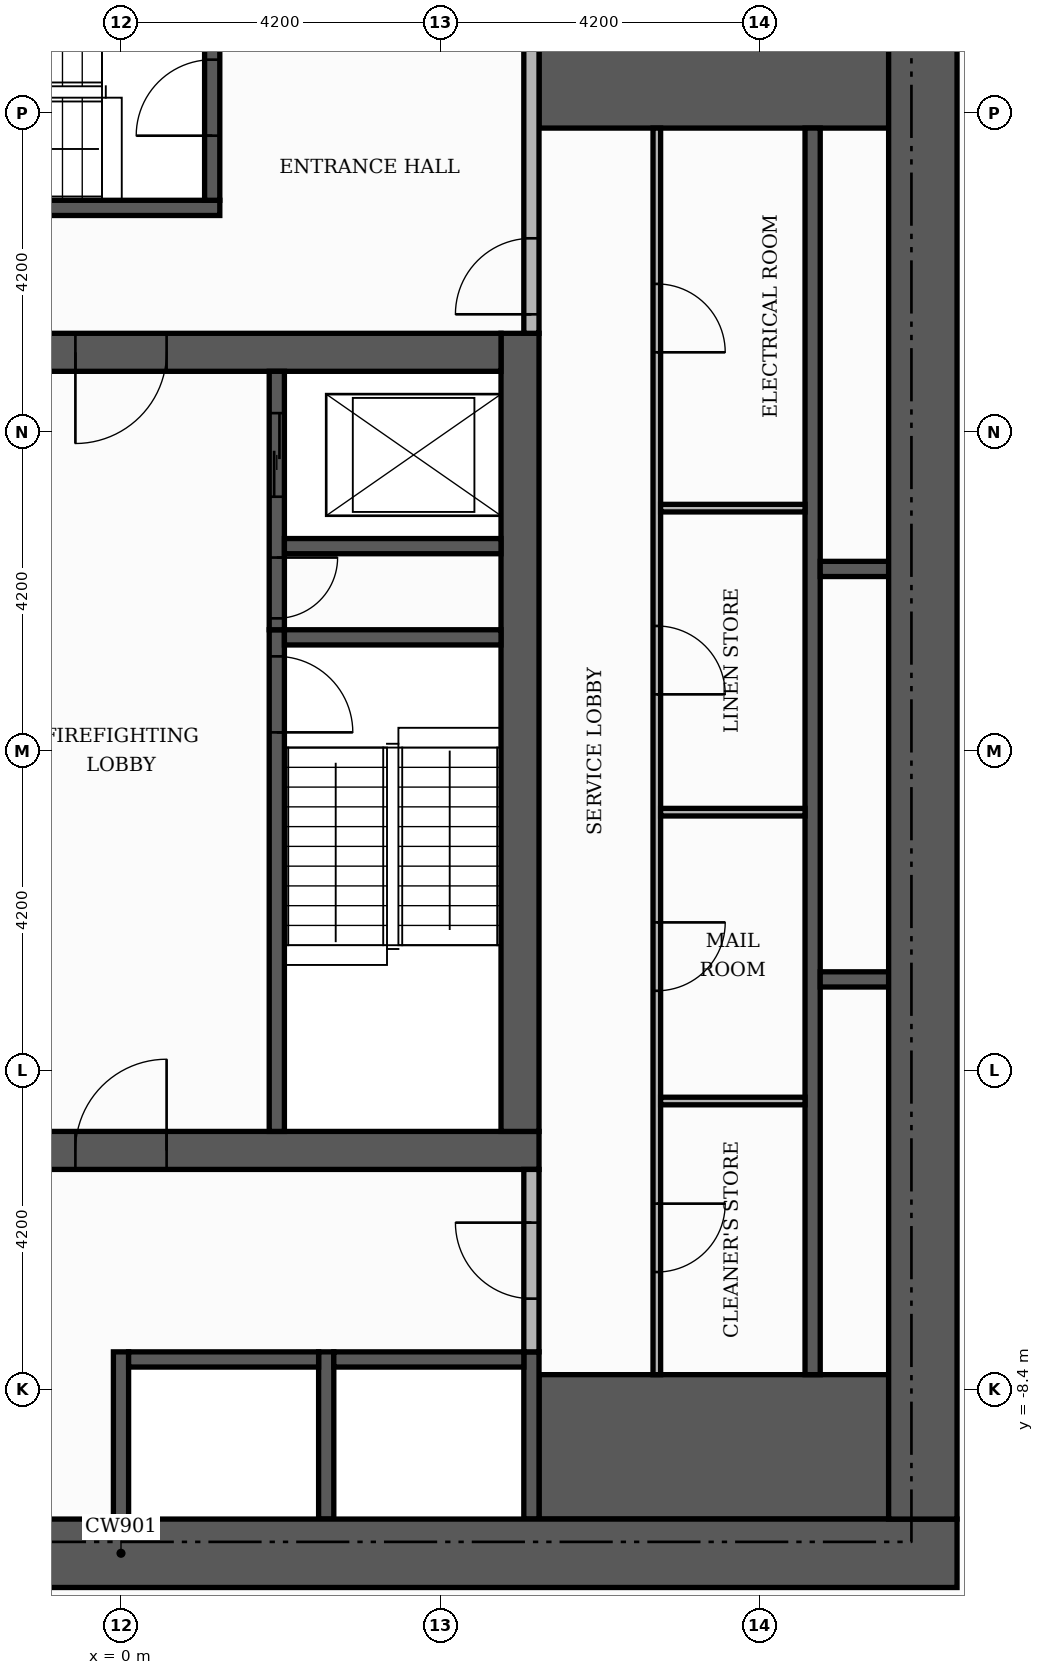
"""IFC4 building model, lengths in metres.
Left out: names, types, materials, properties, quantities, classifications, styles, units other than length and angle.
Written with IfcOpenShell. Run it as: python <this file> out.ifc"""

import sys

from ifc_helpers import new_model, si_unit, direction, frame, frame_2d, origin, place, context, subcontext, project, spatial, rectangle, extrude, element, fill, save


model = new_model("IFC4")
c1 = context("Model", 3, precision=1e-05, world=origin(), true_north=direction((0.0, 1.0)))
c2 = subcontext(c1, "Body", "Model", "MODEL_VIEW")
j1 = project(units=[si_unit("LENGTHUNIT", "METRE"), si_unit("PLANEANGLEUNIT", "RADIAN")], contexts=[c1])
p1 = place(None, origin())
s1 = spatial("IfcSite", under=j1, at=p1, CompositionType="ELEMENT")
p2 = place(p1, origin())
s2 = spatial("IfcBuilding", under=s1, at=p2, CompositionType="ELEMENT")
p3 = place(p2, frame((0.0, 0.0, 27.0)))
s3 = spatial("IfcBuildingStorey", under=s2, at=p3, CompositionType="ELEMENT", Elevation=27.0)
p4 = place(p3, frame((-5.5, -5.25, 0.0), z_axis=(0.0, 0.0, 1.0), x_axis=(1.0, 0.0, 0.0)))
e1 = element("IfcWall", 1, at=p4, inside=s3, PredefinedType="SHEAR", context=c2, shape_type="SweptSolid", body=[
    extrude(rectangle(XDim=11.0, YDim=0.5, at=frame_2d((5.5, 0.0))), origin(), (0.0, 0.0, 1.0), 3.48),
])
p5 = place(p4, frame((4.9, 0.0, 0.0)))
e2 = element("IfcOpeningElement", 2, at=p5, cuts=e1, PredefinedType="OPENING", context=c2, shape_type="SweptSolid", body=[
    extrude(rectangle(XDim=1.2, YDim=2.1, at=frame_2d((0.6, 1.05))), frame((0.0, 0.26, 0.0), z_axis=(0.0, -1.0, 0.0), x_axis=(1.0, 0.0, 0.0)), (0.0, 0.0, 1.0), 0.52),
])
p6 = place(p3, frame((5.25, -5.0, 0.0), z_axis=(0.0, 0.0, 1.0), x_axis=(0.0, 1.0, 0.0)))
e3 = element("IfcWall", 3, at=p6, inside=s3, PredefinedType="SHEAR", context=c2, shape_type="SweptSolid", body=[
    extrude(rectangle(XDim=10.5, YDim=0.5, at=frame_2d((5.25, 0.0))), origin(), (0.0, 0.0, 1.0), 3.48),
])
p7 = place(p3, frame((-5.0, 5.25, 0.0), z_axis=(0.0, 0.0, 1.0), x_axis=(1.0, 0.0, 0.0)))
e4 = element("IfcWall", 4, at=p7, inside=s3, PredefinedType="SHEAR", context=c2, shape_type="SweptSolid", body=[
    extrude(rectangle(XDim=10.0, YDim=0.5, at=frame_2d((5.0, 0.0))), origin(), (0.0, 0.0, 1.0), 3.48),
])
p8 = place(p7, frame((4.4, 0.0, 0.0)))
e5 = element("IfcOpeningElement", 5, at=p8, cuts=e4, PredefinedType="OPENING", context=c2, shape_type="SweptSolid", body=[
    extrude(rectangle(XDim=1.2, YDim=2.1, at=frame_2d((0.6, 1.05))), frame((0.0, 0.26, 0.0), z_axis=(0.0, -1.0, 0.0), x_axis=(1.0, 0.0, 0.0)), (0.0, 0.0, 1.0), 0.52),
])
for number, where, z_axis, x_axis in (
    (6, (5.5, -9.15, 0.0), (0.0, 0.0, 1.0), (1.0, 0.0, 0.0)),
    (7, (5.5, 9.15, 0.0), (0.0, 0.0, 1.0), (1.0, 0.0, 0.0)),
):
    element("IfcWall", number, at=place(p3, frame(where, z_axis=z_axis, x_axis=x_axis)), inside=s3, PredefinedType="SHEAR", context=c2, shape_type="SweptSolid", body=[
        extrude(rectangle(XDim=4.6, YDim=1.9, at=frame_2d((2.3, 0.0))), origin(), (0.0, 0.0, 1.0), 3.48),
    ])
p9 = place(p3, frame((2.05, -5.0, 0.0), z_axis=(0.0, 0.0, 1.0), x_axis=(0.0, 1.0, 0.0)))
e8 = element("IfcWall", 8, at=p9, inside=s3, PredefinedType="SHEAR", context=c2, shape_type="SweptSolid", body=[
    extrude(rectangle(XDim=6.6, YDim=0.2, at=frame_2d((3.3, 0.0))), origin(), (0.0, 0.0, 1.0), 3.48),
])
p10 = place(p9, frame((5.25, 0.0, 0.0)))
e9 = element("IfcOpeningElement", 9, at=p10, cuts=e8, PredefinedType="OPENING", context=c2, shape_type="SweptSolid", body=[
    extrude(rectangle(XDim=1.0, YDim=2.1, at=frame_2d((0.5, 1.05))), frame((0.0, 0.11, 0.0), z_axis=(0.0, -1.0, 0.0), x_axis=(1.0, 0.0, 0.0)), (0.0, 0.0, 1.0), 0.22),
])
p11 = place(p3, frame((2.15, 1.5, 0.0), z_axis=(0.0, 0.0, 1.0), x_axis=(1.0, 0.0, 0.0)))
e10 = element("IfcWall", 10, at=p11, inside=s3, PredefinedType="SHEAR", context=c2, shape_type="SweptSolid", body=[
    extrude(rectangle(XDim=2.85, YDim=0.2, at=frame_2d((1.425, 0.0))), origin(), (0.0, 0.0, 1.0), 3.48),
])
p12 = place(p3, frame((-5.5, 7.15, 0.0), z_axis=(0.0, 0.0, 1.0), x_axis=(1.0, 0.0, 0.0)))
e11 = element("IfcWall", 11, at=p12, inside=s3, PredefinedType="SHEAR", context=c2, shape_type="SweptSolid", body=[
    extrude(rectangle(XDim=6.8, YDim=0.2, at=frame_2d((3.4, 0.0))), origin(), (0.0, 0.0, 1.0), 3.48),
])
p13 = place(p3, frame((1.2, 7.25, 0.0), z_axis=(0.0, 0.0, 1.0), x_axis=(0.0, 1.0, 0.0)))
e12 = element("IfcWall", 12, at=p13, inside=s3, PredefinedType="SHEAR", context=c2, shape_type="SweptSolid", body=[
    extrude(rectangle(XDim=2.85, YDim=0.2, at=frame_2d((1.425, 0.0))), origin(), (0.0, 0.0, 1.0), 3.48),
])
p14 = place(p13, frame((0.85, 0.0, 0.0)))
e13 = element("IfcOpeningElement", 13, at=p14, cuts=e12, PredefinedType="OPENING", context=c2, shape_type="SweptSolid", body=[
    extrude(rectangle(XDim=1.0, YDim=2.1, at=frame_2d((0.5, 1.05))), frame((0.0, 0.11, 0.0), z_axis=(0.0, -1.0, 0.0), x_axis=(1.0, 0.0, 0.0)), (0.0, 0.0, 1.0), 0.22),
])
for number, where, z_axis, x_axis in (
    (14, (0.0, -10.1, 0.0), (0.0, 0.0, 1.0), (0.0, 1.0, 0.0)),
    (15, (2.7, -10.1, 0.0), (0.0, 0.0, 1.0), (0.0, 1.0, 0.0)),
    (16, (5.4, -10.1, 0.0), (0.0, 0.0, 1.0), (0.0, 1.0, 0.0)),
):
    element("IfcWall", number, at=place(p3, frame(where, z_axis=z_axis, x_axis=x_axis)), inside=s3, PredefinedType="SHEAR", context=c2, shape_type="SweptSolid", body=[
        extrude(rectangle(XDim=2.2, YDim=0.2, at=frame_2d((1.1, 0.0))), origin(), (0.0, 0.0, 1.0), 3.48),
    ])
p15 = place(p3, frame((9.1, -8.2, 0.0), z_axis=(0.0, 0.0, 1.0), x_axis=(0.0, 1.0, 0.0)))
e17 = element("IfcWall", 17, at=p15, inside=s3, PredefinedType="SHEAR", context=c2, shape_type="SweptSolid", body=[
    extrude(rectangle(XDim=16.4, YDim=0.2, at=frame_2d((8.2, 0.0))), origin(), (0.0, 0.0, 1.0), 3.48),
])
for number, where, z_axis, x_axis in (
    (18, (0.1, -8.0, 0.0), (0.0, 0.0, 1.0), (1.0, 0.0, 0.0)),
    (19, (2.8, -8.0, 0.0), (0.0, 0.0, 1.0), (1.0, 0.0, 0.0)),
):
    element("IfcWall", number, at=place(p3, frame(where, z_axis=z_axis, x_axis=x_axis)), inside=s3, PredefinedType="SHEAR", context=c2, shape_type="SweptSolid", body=[
        extrude(rectangle(XDim=2.5, YDim=0.2, at=frame_2d((1.25, 0.0))), origin(), (0.0, 0.0, 1.0), 3.48),
    ])
p16 = place(p3, frame((9.2, -3.0, 0.0), z_axis=(0.0, 0.0, 1.0), x_axis=(1.0, 0.0, 0.0)))
e20 = element("IfcWall", 20, at=p16, inside=s3, PredefinedType="SHEAR", context=c2, shape_type="SweptSolid", body=[
    extrude(rectangle(XDim=0.9, YDim=0.2, at=frame_2d((0.45, 0.0))), origin(), (0.0, 0.0, 1.0), 3.48),
])
p17 = place(p3, frame((2.05, 1.6, 0.0), z_axis=(0.0, 0.0, 1.0), x_axis=(0.0, 1.0, 0.0)))
e21 = element("IfcWall", 21, at=p17, inside=s3, PredefinedType="SHEAR", context=c2, shape_type="SweptSolid", body=[
    extrude(rectangle(XDim=3.4, YDim=0.2, at=frame_2d((1.7, 0.0))), origin(), (0.0, 0.0, 1.0), 3.48),
])
p18 = place(p17, frame((1.75, 0.0, 0.0)))
e22 = element("IfcOpeningElement", 22, at=p18, cuts=e21, PredefinedType="OPENING", context=c2, shape_type="SweptSolid", body=[
    extrude(rectangle(XDim=1.1, YDim=2.1, at=frame_2d((0.55, 1.05))), frame((0.0, 0.11, 0.0), z_axis=(0.0, -1.0, 0.0), x_axis=(1.0, 0.0, 0.0)), (0.0, 0.0, 1.0), 0.22),
])
p19 = place(p17, frame((0.15, 0.0, 0.0)))
e23 = element("IfcOpeningElement", 23, at=p19, cuts=e21, PredefinedType="OPENING", context=c2, shape_type="SweptSolid", body=[
    extrude(rectangle(XDim=0.8, YDim=2.1, at=frame_2d((0.4, 1.05))), frame((0.0, 0.11, 0.0), z_axis=(0.0, -1.0, 0.0), x_axis=(1.0, 0.0, 0.0)), (0.0, 0.0, 1.0), 0.22),
])
p20 = place(p3, frame((9.2, 2.4, 0.0), z_axis=(0.0, 0.0, 1.0), x_axis=(1.0, 0.0, 0.0)))
e24 = element("IfcWall", 24, at=p20, inside=s3, PredefinedType="SHEAR", context=c2, shape_type="SweptSolid", body=[
    extrude(rectangle(XDim=0.9, YDim=0.2, at=frame_2d((0.45, 0.0))), origin(), (0.0, 0.0, 1.0), 3.48),
])
p21 = place(p3, frame((2.15, 2.7, 0.0), z_axis=(0.0, 0.0, 1.0), x_axis=(1.0, 0.0, 0.0)))
e25 = element("IfcWall", 25, at=p21, inside=s3, PredefinedType="SHEAR", context=c2, shape_type="SweptSolid", body=[
    extrude(rectangle(XDim=2.85, YDim=0.2, at=frame_2d((1.425, 0.0))), origin(), (0.0, 0.0, 1.0), 3.48),
])
p22 = place(p3, frame((-11.0, -10.55, 0.0), z_axis=(0.0, 0.0, 1.0), x_axis=(1.0, 0.0, 0.0)))
e26 = element("IfcWall", 26, at=p22, inside=s3, PredefinedType="SHEAR", context=c2, shape_type="SweptSolid", body=[
    extrude(rectangle(XDim=22.0, YDim=0.9, at=frame_2d((11.0, 0.0))), origin(), (0.0, 0.0, 1.0), 3.48),
])
p23 = place(p22, frame((7.4, 0.0, 0.0)))
e27 = element("IfcOpeningElement", 27, at=p23, cuts=e26, PredefinedType="OPENING", context=c2, shape_type="SweptSolid", body=[
    extrude(rectangle(XDim=1.8, YDim=2.2, at=frame_2d((0.9, 1.1))), frame((0.0, 0.46, 0.0), z_axis=(0.0, -1.0, 0.0), x_axis=(1.0, 0.0, 0.0)), (0.0, 0.0, 1.0), 0.92),
])
p24 = place(p3, frame((10.55, -10.1, 0.0), z_axis=(0.0, 0.0, 1.0), x_axis=(0.0, 1.0, 0.0)))
e28 = element("IfcWall", 28, at=p24, inside=s3, PredefinedType="SHEAR", context=c2, shape_type="SweptSolid", body=[
    extrude(rectangle(XDim=20.2, YDim=0.9, at=frame_2d((10.1, 0.0))), origin(), (0.0, 0.0, 1.0), 3.48),
])
p25 = place(p3, frame((7.05, -8.2, 0.0), z_axis=(0.0, 0.0, 1.0), x_axis=(0.0, 1.0, 0.0)))
e29 = element("IfcWall", 29, at=p25, inside=s3, PredefinedType="PARTITIONING", context=c2, shape_type="SweptSolid", body=[
    extrude(rectangle(XDim=16.4, YDim=0.1, at=frame_2d((8.2, 0.0))), origin(), (0.0, 0.0, 1.0), 3.48),
])
p26 = place(p25, frame((1.35, 0.0, 0.0)))
e30 = element("IfcOpeningElement", 30, at=p26, cuts=e29, PredefinedType="OPENING", context=c2, shape_type="SweptSolid", body=[
    extrude(rectangle(XDim=0.9, YDim=2.1, at=frame_2d((0.45, 1.05))), frame((0.0, 0.06, 0.0), z_axis=(0.0, -1.0, 0.0), x_axis=(1.0, 0.0, 0.0)), (0.0, 0.0, 1.0), 0.12),
])
p27 = place(p25, frame((5.05, 0.0, 0.0)))
e31 = element("IfcOpeningElement", 31, at=p27, cuts=e29, PredefinedType="OPENING", context=c2, shape_type="SweptSolid", body=[
    extrude(rectangle(XDim=0.9, YDim=2.1, at=frame_2d((0.45, 1.05))), frame((0.0, 0.06, 0.0), z_axis=(0.0, -1.0, 0.0), x_axis=(1.0, 0.0, 0.0)), (0.0, 0.0, 1.0), 0.12),
])
p28 = place(p25, frame((8.95, 0.0, 0.0)))
e32 = element("IfcOpeningElement", 32, at=p28, cuts=e29, PredefinedType="OPENING", context=c2, shape_type="SweptSolid", body=[
    extrude(rectangle(XDim=0.9, YDim=2.1, at=frame_2d((0.45, 1.05))), frame((0.0, 0.06, 0.0), z_axis=(0.0, -1.0, 0.0), x_axis=(1.0, 0.0, 0.0)), (0.0, 0.0, 1.0), 0.12),
])
p29 = place(p25, frame((13.45, 0.0, 0.0)))
e33 = element("IfcOpeningElement", 33, at=p29, cuts=e29, PredefinedType="OPENING", context=c2, shape_type="SweptSolid", body=[
    extrude(rectangle(XDim=0.9, YDim=2.1, at=frame_2d((0.45, 1.05))), frame((0.0, 0.06, 0.0), z_axis=(0.0, -1.0, 0.0), x_axis=(1.0, 0.0, 0.0)), (0.0, 0.0, 1.0), 0.12),
])
p30 = place(p3, frame((5.4, -7.9, 0.0), z_axis=(0.0, 0.0, 1.0), x_axis=(0.0, 1.0, 0.0)))
e34 = element("IfcWall", 34, at=p30, inside=s3, PredefinedType="PARTITIONING", context=c2, shape_type="SweptSolid", body=[
    extrude(rectangle(XDim=2.4, YDim=0.2, at=frame_2d((1.2, 0.0))), origin(), (0.0, 0.0, 1.0), 3.48),
])
p31 = place(p30, frame((0.7, 0.0, 0.0)))
e35 = element("IfcOpeningElement", 35, at=p31, cuts=e34, PredefinedType="OPENING", context=c2, shape_type="SweptSolid", body=[
    extrude(rectangle(XDim=1.0, YDim=2.1, at=frame_2d((0.5, 1.05))), frame((0.0, 0.11, 0.0), z_axis=(0.0, -1.0, 0.0), x_axis=(1.0, 0.0, 0.0)), (0.0, 0.0, 1.0), 0.22),
])
for number, where, z_axis, x_axis in (
    (36, (7.1, -4.6, 0.0), (0.0, 0.0, 1.0), (1.0, 0.0, 0.0)),
    (37, (7.1, -0.8, 0.0), (0.0, 0.0, 1.0), (1.0, 0.0, 0.0)),
    (38, (7.1, 3.2, 0.0), (0.0, 0.0, 1.0), (1.0, 0.0, 0.0)),
):
    element("IfcWall", number, at=place(p3, frame(where, z_axis=z_axis, x_axis=x_axis)), inside=s3, PredefinedType="PARTITIONING", context=c2, shape_type="SweptSolid", body=[
        extrude(rectangle(XDim=1.9, YDim=0.1, at=frame_2d((0.95, 0.0))), origin(), (0.0, 0.0, 1.0), 3.48),
    ])
p32 = place(p3, frame((5.4, 5.5, 0.0), z_axis=(0.0, 0.0, 1.0), x_axis=(0.0, 1.0, 0.0)))
e39 = element("IfcWall", 39, at=p32, inside=s3, PredefinedType="PARTITIONING", context=c2, shape_type="SweptSolid", body=[
    extrude(rectangle(XDim=4.6, YDim=0.2, at=frame_2d((2.3, 0.0))), origin(), (0.0, 0.0, 1.0), 3.48),
])
p33 = place(p32, frame((0.25, 0.0, 0.0)))
e40 = element("IfcOpeningElement", 40, at=p33, cuts=e39, PredefinedType="OPENING", context=c2, shape_type="SweptSolid", body=[
    extrude(rectangle(XDim=1.0, YDim=2.1, at=frame_2d((0.5, 1.05))), frame((0.0, 0.11, 0.0), z_axis=(0.0, -1.0, 0.0), x_axis=(1.0, 0.0, 0.0)), (0.0, 0.0, 1.0), 0.22),
])
p34 = place(p18, origin())
e41 = element("IfcDoor", 41, at=p34, inside=s3, OperationType="SLIDING_TO_LEFT", PredefinedType="DOOR", context=c2, shape_type="SweptSolid", body=[
    extrude(rectangle(XDim=1.1, YDim=2.1, at=frame_2d((0.55, 1.05))), frame((0.0, 0.025, 0.0), z_axis=(0.0, -1.0, 0.0), x_axis=(1.0, 0.0, 0.0)), (0.0, 0.0, 1.0), 0.05),
])
fill(e22, e41)
p35 = place(p10, frame((1.0, 0.0, 0.0), z_axis=(0.0, 0.0, 1.0), x_axis=(-1.0, 0.0, 0.0)))
e42 = element("IfcDoor", 42, at=p35, inside=s3, OperationType="SINGLE_SWING_LEFT", PredefinedType="DOOR", context=c2, shape_type="SweptSolid", body=[
    extrude(rectangle(XDim=1.0, YDim=2.1, at=frame_2d((0.5, 1.05))), frame((0.0, 0.025, 0.0), z_axis=(0.0, -1.0, 0.0), x_axis=(1.0, 0.0, 0.0)), (0.0, 0.0, 1.0), 0.05),
])
fill(e9, e42)
p36 = place(p19, frame((0.8, 0.0, 0.0), z_axis=(0.0, 0.0, 1.0), x_axis=(-1.0, 0.0, 0.0)))
e43 = element("IfcDoor", 43, at=p36, inside=s3, OperationType="SINGLE_SWING_RIGHT", PredefinedType="DOOR", context=c2, shape_type="SweptSolid", body=[
    extrude(rectangle(XDim=0.8, YDim=2.1, at=frame_2d((0.4, 1.05))), frame((0.0, 0.025, 0.0), z_axis=(0.0, -1.0, 0.0), x_axis=(1.0, 0.0, 0.0)), (0.0, 0.0, 1.0), 0.05),
])
fill(e23, e43)
p37 = place(p8, frame((1.2, 0.0, 0.0), z_axis=(0.0, 0.0, 1.0), x_axis=(-1.0, 0.0, 0.0)))
e44 = element("IfcDoor", 44, at=p37, inside=s3, OperationType="SINGLE_SWING_LEFT", PredefinedType="DOOR", context=c2, shape_type="SweptSolid", body=[
    extrude(rectangle(XDim=1.2, YDim=2.1, at=frame_2d((0.6, 1.05))), frame((0.0, 0.025, 0.0), z_axis=(0.0, -1.0, 0.0), x_axis=(1.0, 0.0, 0.0)), (0.0, 0.0, 1.0), 0.05),
])
fill(e5, e44)
p38 = place(p5, origin())
e45 = element("IfcDoor", 45, at=p38, inside=s3, OperationType="SINGLE_SWING_RIGHT", PredefinedType="DOOR", context=c2, shape_type="SweptSolid", body=[
    extrude(rectangle(XDim=1.2, YDim=2.1, at=frame_2d((0.6, 1.05))), frame((0.0, 0.025, 0.0), z_axis=(0.0, -1.0, 0.0), x_axis=(1.0, 0.0, 0.0)), (0.0, 0.0, 1.0), 0.05),
])
fill(e2, e45)
p39 = place(p14, origin())
e46 = element("IfcDoor", 46, at=p39, inside=s3, OperationType="SINGLE_SWING_LEFT", PredefinedType="DOOR", context=c2, shape_type="SweptSolid", body=[
    extrude(rectangle(XDim=1.0, YDim=2.1, at=frame_2d((0.5, 1.05))), frame((0.0, 0.025, 0.0), z_axis=(0.0, -1.0, 0.0), x_axis=(1.0, 0.0, 0.0)), (0.0, 0.0, 1.0), 0.05),
])
fill(e13, e46)
p40 = place(p33, origin())
e47 = element("IfcDoor", 47, at=p40, inside=s3, OperationType="SINGLE_SWING_LEFT", PredefinedType="DOOR", context=c2, shape_type="SweptSolid", body=[
    extrude(rectangle(XDim=1.0, YDim=2.1, at=frame_2d((0.5, 1.05))), frame((0.0, 0.025, 0.0), z_axis=(0.0, -1.0, 0.0), x_axis=(1.0, 0.0, 0.0)), (0.0, 0.0, 1.0), 0.05),
])
fill(e40, e47)
p41 = place(p31, origin())
e48 = element("IfcDoor", 48, at=p41, inside=s3, OperationType="SINGLE_SWING_RIGHT", PredefinedType="DOOR", context=c2, shape_type="SweptSolid", body=[
    extrude(rectangle(XDim=1.0, YDim=2.1, at=frame_2d((0.5, 1.05))), frame((0.0, 0.025, 0.0), z_axis=(0.0, -1.0, 0.0), x_axis=(1.0, 0.0, 0.0)), (0.0, 0.0, 1.0), 0.05),
])
fill(e35, e48)
p42 = place(p26, frame((0.9, 0.0, 0.0), z_axis=(0.0, 0.0, 1.0), x_axis=(-1.0, 0.0, 0.0)))
e49 = element("IfcDoor", 49, at=p42, inside=s3, OperationType="SINGLE_SWING_RIGHT", PredefinedType="DOOR", context=c2, shape_type="SweptSolid", body=[
    extrude(rectangle(XDim=0.9, YDim=2.1, at=frame_2d((0.45, 1.05))), frame((0.0, 0.025, 0.0), z_axis=(0.0, -1.0, 0.0), x_axis=(1.0, 0.0, 0.0)), (0.0, 0.0, 1.0), 0.05),
])
fill(e30, e49)
p43 = place(p27, frame((0.9, 0.0, 0.0), z_axis=(0.0, 0.0, 1.0), x_axis=(-1.0, 0.0, 0.0)))
e50 = element("IfcDoor", 50, at=p43, inside=s3, OperationType="SINGLE_SWING_RIGHT", PredefinedType="DOOR", context=c2, shape_type="SweptSolid", body=[
    extrude(rectangle(XDim=0.9, YDim=2.1, at=frame_2d((0.45, 1.05))), frame((0.0, 0.025, 0.0), z_axis=(0.0, -1.0, 0.0), x_axis=(1.0, 0.0, 0.0)), (0.0, 0.0, 1.0), 0.05),
])
fill(e31, e50)
p44 = place(p28, frame((0.9, 0.0, 0.0), z_axis=(0.0, 0.0, 1.0), x_axis=(-1.0, 0.0, 0.0)))
e51 = element("IfcDoor", 51, at=p44, inside=s3, OperationType="SINGLE_SWING_LEFT", PredefinedType="DOOR", context=c2, shape_type="SweptSolid", body=[
    extrude(rectangle(XDim=0.9, YDim=2.1, at=frame_2d((0.45, 1.05))), frame((0.0, 0.025, 0.0), z_axis=(0.0, -1.0, 0.0), x_axis=(1.0, 0.0, 0.0)), (0.0, 0.0, 1.0), 0.05),
])
fill(e32, e51)
p45 = place(p29, frame((0.9, 0.0, 0.0), z_axis=(0.0, 0.0, 1.0), x_axis=(-1.0, 0.0, 0.0)))
e52 = element("IfcDoor", 52, at=p45, inside=s3, OperationType="SINGLE_SWING_LEFT", PredefinedType="DOOR", context=c2, shape_type="SweptSolid", body=[
    extrude(rectangle(XDim=0.9, YDim=2.1, at=frame_2d((0.45, 1.05))), frame((0.0, 0.025, 0.0), z_axis=(0.0, -1.0, 0.0), x_axis=(1.0, 0.0, 0.0)), (0.0, 0.0, 1.0), 0.05),
])
fill(e33, e52)
save(model, sys.argv[1])
